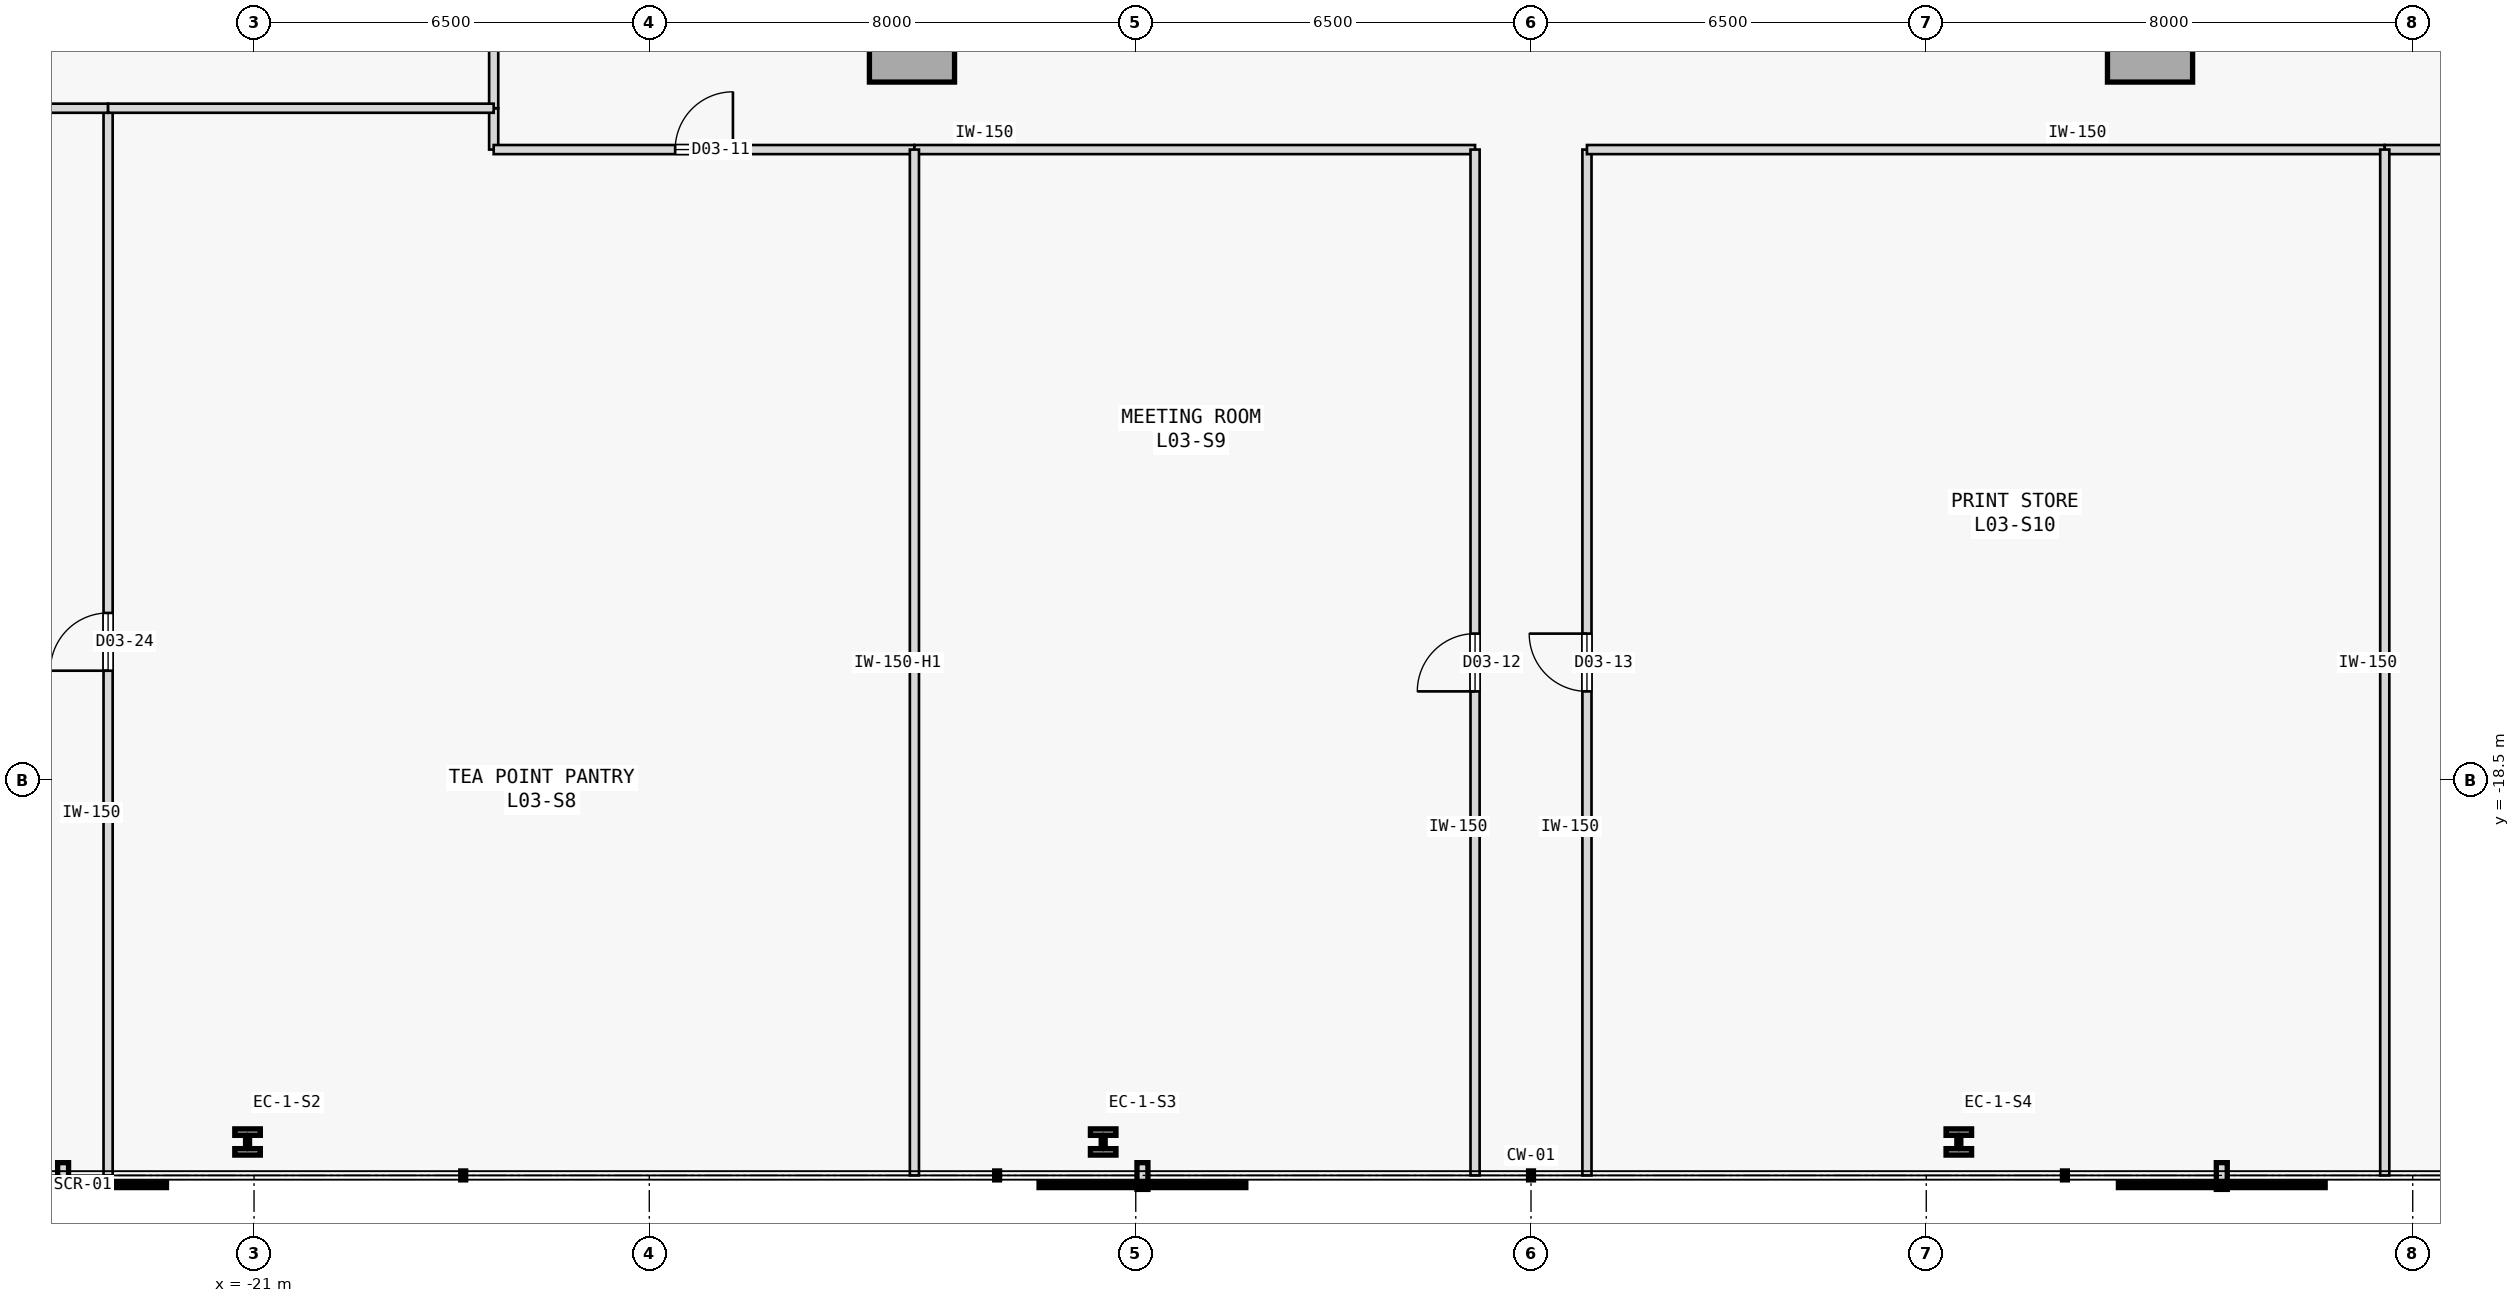
"""IFC4 building model, lengths in metres.
Left out: names, types, materials, properties, quantities, classifications, styles, units other than length and angle.
Written with IfcOpenShell. Run it as: python <this file> out.ifc"""

import sys

from ifc_helpers import new_model, si_unit, direction, frame, frame_2d, origin, origin_2d, place, context, subcontext, project, spatial, rectangle, i_section, extrude, element, fill, save


model = new_model("IFC4")
c1 = context("Model", 3, precision=1e-05, world=origin(), true_north=direction((0.0, 1.0)))
c2 = subcontext(c1, "Body", "Model", "MODEL_VIEW")
j1 = project(units=[si_unit("LENGTHUNIT", "METRE"), si_unit("PLANEANGLEUNIT", "RADIAN")], contexts=[c1])
p1 = place(None, origin())
s1 = spatial("IfcSite", under=j1, at=p1, CompositionType="ELEMENT")
p2 = place(p1, origin())
s2 = spatial("IfcBuilding", under=s1, at=p2, CompositionType="ELEMENT")
p3 = place(p2, frame((0.0, 0.0, 18.0)))
s3 = spatial("IfcBuildingStorey", under=s2, at=p3, CompositionType="ELEMENT", Elevation=18.0)
for number, where, z_axis, x_axis in (
    (1, (-10.18, -6.32, 0.0), (0.0, 0.0, 1.0), (1.0, 0.0, 0.0)),
    (2, (10.18, -6.32, 0.0), (0.0, 0.0, 1.0), (1.0, 0.0, 0.0)),
):
    element("IfcColumn", number, at=place(p3, frame(where, z_axis=z_axis, x_axis=x_axis)), inside=s3, PredefinedType="COLUMN", context=c2, shape_type="SweptSolid", body=[
        extrude(rectangle(XDim=1.4, YDim=1.4, at=origin_2d()), origin(), (0.0, 0.0, 1.0), 3.8),
    ])
for number, where, z_axis, x_axis in (
    (3, (-21.107, -24.45, 0.0), (0.0, 0.0, 1.0), (1.0, 0.0, 0.0)),
    (4, (-7.036, -24.45, 0.0), (0.0, 0.0, 1.0), (1.0, 0.0, 0.0)),
    (5, (7.036, -24.45, 0.0), (0.0, 0.0, 1.0), (1.0, 0.0, 0.0)),
):
    element("IfcColumn", number, at=place(p3, frame(where, z_axis=z_axis, x_axis=x_axis)), inside=s3, PredefinedType="COLUMN", context=c2, shape_type="SweptSolid", body=[
        extrude(i_section(OverallWidth=0.42, OverallDepth=0.431, WebThickness=0.065, FlangeThickness=0.106, FilletRadius=0.015, at=origin_2d()), origin(), (0.0, 0.0, 1.0), 3.8),
    ])
p4 = place(p3, frame((-17.059, -8.13, 0.0), z_axis=(0.0, 0.0, 1.0), x_axis=(0.0, 1.0, 0.0)))
e6 = element("IfcWall", 6, at=p4, inside=s3, PredefinedType="PARTITIONING", context=c2, shape_type="SweptSolid", body=[
    extrude(rectangle(XDim=0.68, YDim=0.15, at=frame_2d((0.34, 0.0))), origin(), (0.0, 0.0, 1.0), 3.575),
])
p5 = place(p3, frame((-17.059, -8.13, 0.0), z_axis=(0.0, 0.0, 1.0), x_axis=(1.0, 0.0, 0.0)))
e7 = element("IfcWall", 7, at=p5, inside=s3, PredefinedType="PARTITIONING", context=c2, shape_type="SweptSolid", body=[
    extrude(rectangle(XDim=6.919, YDim=0.15, at=frame_2d((3.459, 0.0))), origin(), (0.0, 0.0, 1.0), 3.575),
])
p6 = place(p5, frame((2.985, 0.0, 0.0)))
e8 = element("IfcOpeningElement", 8, at=p6, cuts=e7, PredefinedType="OPENING", context=c2, shape_type="SweptSolid", body=[
    extrude(rectangle(XDim=0.95, YDim=2.15, at=frame_2d((0.475, 1.075))), frame((0.0, 0.085, 0.0), z_axis=(0.0, -1.0, 0.0), x_axis=(1.0, 0.0, 0.0)), (0.0, 0.0, 1.0), 0.17),
])
p7 = place(p3, frame((-10.14, -8.13, 0.0), z_axis=(0.0, 0.0, 1.0), x_axis=(1.0, 0.0, 0.0)))
e9 = element("IfcWall", 9, at=p7, inside=s3, PredefinedType="PARTITIONING", context=c2, shape_type="SweptSolid", body=[
    extrude(rectangle(XDim=9.22, YDim=0.15, at=frame_2d((4.61, 0.0))), origin(), (0.0, 0.0, 1.0), 3.575),
])
p8 = place(p3, frame((-0.92, -25.0, 0.0), z_axis=(0.0, 0.0, 1.0), x_axis=(0.0, 1.0, 0.0)))
e10 = element("IfcWall", 10, at=p8, inside=s3, PredefinedType="PARTITIONING", context=c2, shape_type="SweptSolid", body=[
    extrude(rectangle(XDim=16.87, YDim=0.15, at=frame_2d((8.435, 0.0))), origin(), (0.0, 0.0, 1.0), 3.575),
])
p9 = place(p8, frame((7.96, 0.0, 0.0)))
e11 = element("IfcOpeningElement", 11, at=p9, cuts=e10, PredefinedType="OPENING", context=c2, shape_type="SweptSolid", body=[
    extrude(rectangle(XDim=0.95, YDim=2.15, at=frame_2d((0.475, 1.075))), frame((0.0, 0.085, 0.0), z_axis=(0.0, -1.0, 0.0), x_axis=(1.0, 0.0, 0.0)), (0.0, 0.0, 1.0), 0.17),
])
p10 = place(p3, frame((0.92, -25.0, 0.0), z_axis=(0.0, 0.0, 1.0), x_axis=(0.0, 1.0, 0.0)))
e12 = element("IfcWall", 12, at=p10, inside=s3, PredefinedType="PARTITIONING", context=c2, shape_type="SweptSolid", body=[
    extrude(rectangle(XDim=16.87, YDim=0.15, at=frame_2d((8.435, 0.0))), origin(), (0.0, 0.0, 1.0), 3.575),
])
p11 = place(p10, frame((7.96, 0.0, 0.0)))
e13 = element("IfcOpeningElement", 13, at=p11, cuts=e12, PredefinedType="OPENING", context=c2, shape_type="SweptSolid", body=[
    extrude(rectangle(XDim=0.95, YDim=2.15, at=frame_2d((0.475, 1.075))), frame((0.0, 0.085, 0.0), z_axis=(0.0, -1.0, 0.0), x_axis=(1.0, 0.0, 0.0)), (0.0, 0.0, 1.0), 0.17),
])
p12 = place(p3, frame((0.92, -8.13, 0.0), z_axis=(0.0, 0.0, 1.0), x_axis=(1.0, 0.0, 0.0)))
e14 = element("IfcWall", 14, at=p12, inside=s3, PredefinedType="PARTITIONING", context=c2, shape_type="SweptSolid", body=[
    extrude(rectangle(XDim=13.12, YDim=0.15, at=frame_2d((6.56, 0.0))), origin(), (0.0, 0.0, 1.0), 3.575),
])
p13 = place(p3, frame((14.04, -8.13, 0.0), z_axis=(0.0, 0.0, 1.0), x_axis=(1.0, 0.0, 0.0)))
e15 = element("IfcWall", 15, at=p13, inside=s3, PredefinedType="PARTITIONING", context=c2, shape_type="SweptSolid", body=[
    extrude(rectangle(XDim=3.019, YDim=0.15, at=frame_2d((1.51, 0.0))), origin(), (0.0, 0.0, 1.0), 3.575),
])
p14 = place(p13, frame((1.034, 0.0, 0.0)))
e16 = element("IfcOpeningElement", 16, at=p14, cuts=e15, PredefinedType="OPENING", context=c2, shape_type="SweptSolid", body=[
    extrude(rectangle(XDim=0.95, YDim=2.15, at=frame_2d((0.475, 1.075))), frame((0.0, 0.085, 0.0), z_axis=(0.0, -1.0, 0.0), x_axis=(1.0, 0.0, 0.0)), (0.0, 0.0, 1.0), 0.17),
])
p15 = place(p3, frame((-17.059, -7.45, 0.0), z_axis=(0.0, 0.0, 1.0), x_axis=(0.0, 1.0, 0.0)))
e17 = element("IfcWall", 17, at=p15, inside=s3, PredefinedType="PARTITIONING", context=c2, shape_type="SweptSolid", body=[
    extrude(rectangle(XDim=3.129, YDim=0.15, at=frame_2d((1.564, 0.0))), origin(), (0.0, 0.0, 1.0), 3.575),
])
p16 = place(p15, frame((1.09, 0.0, 0.0)))
e18 = element("IfcOpeningElement", 18, at=p16, cuts=e17, PredefinedType="OPENING", context=c2, shape_type="SweptSolid", body=[
    extrude(rectangle(XDim=0.95, YDim=2.15, at=frame_2d((0.475, 1.075))), frame((0.0, 0.085, 0.0), z_axis=(0.0, -1.0, 0.0), x_axis=(1.0, 0.0, 0.0)), (0.0, 0.0, 1.0), 0.17),
])
p17 = place(p3, frame((-23.4, -25.0, 0.0), z_axis=(0.0, 0.0, 1.0), x_axis=(0.0, 1.0, 0.0)))
e19 = element("IfcWall", 19, at=p17, inside=s3, PredefinedType="PARTITIONING", context=c2, shape_type="SweptSolid", body=[
    extrude(rectangle(XDim=17.55, YDim=0.15, at=frame_2d((8.775, 0.0))), origin(), (0.0, 0.0, 1.0), 3.575),
])
p18 = place(p17, frame((8.3, 0.0, 0.0)))
e20 = element("IfcOpeningElement", 20, at=p18, cuts=e19, PredefinedType="OPENING", context=c2, shape_type="SweptSolid", body=[
    extrude(rectangle(XDim=0.95, YDim=2.15, at=frame_2d((0.475, 1.075))), frame((0.0, 0.085, 0.0), z_axis=(0.0, -1.0, 0.0), x_axis=(1.0, 0.0, 0.0)), (0.0, 0.0, 1.0), 0.17),
])
p19 = place(p3, frame((-39.0, -7.45, 0.0), z_axis=(0.0, 0.0, 1.0), x_axis=(1.0, 0.0, 0.0)))
e21 = element("IfcWall", 21, at=p19, inside=s3, PredefinedType="PARTITIONING", context=c2, shape_type="SweptSolid", body=[
    extrude(rectangle(XDim=15.6, YDim=0.15, at=frame_2d((7.8, 0.0))), origin(), (0.0, 0.0, 1.0), 3.575),
])
p20 = place(p3, frame((-10.14, -25.0, 0.0), z_axis=(0.0, 0.0, 1.0), x_axis=(0.0, 1.0, 0.0)))
e22 = element("IfcWall", 22, at=p20, inside=s3, PredefinedType="PARTITIONING", context=c2, shape_type="SweptSolid", body=[
    extrude(rectangle(XDim=16.87, YDim=0.15, at=frame_2d((8.435, 0.0))), origin(), (0.0, 0.0, 1.0), 3.125),
])
p21 = place(p3, frame((-23.4, -7.45, 0.0), z_axis=(0.0, 0.0, 1.0), x_axis=(1.0, 0.0, 0.0)))
e23 = element("IfcWall", 23, at=p21, inside=s3, PredefinedType="PARTITIONING", context=c2, shape_type="SweptSolid", body=[
    extrude(rectangle(XDim=6.341, YDim=0.15, at=frame_2d((3.17, 0.0))), origin(), (0.0, 0.0, 1.0), 3.575),
])
p22 = place(p3, frame((14.04, -25.0, 0.0), z_axis=(0.0, 0.0, 1.0), x_axis=(0.0, 1.0, 0.0)))
e24 = element("IfcWall", 24, at=p22, inside=s3, PredefinedType="PARTITIONING", context=c2, shape_type="SweptSolid", body=[
    extrude(rectangle(XDim=16.87, YDim=0.15, at=frame_2d((8.435, 0.0))), origin(), (0.0, 0.0, 1.0), 3.575),
])
p23 = place(p6, origin())
e25 = element("IfcDoor", 25, at=p23, inside=s3, OperationType="SINGLE_SWING_RIGHT", PredefinedType="DOOR", context=c2, shape_type="SweptSolid", body=[
    extrude(rectangle(XDim=0.95, YDim=2.15, at=frame_2d((0.475, 1.075))), frame((0.0, 0.025, 0.0), z_axis=(0.0, -1.0, 0.0), x_axis=(1.0, 0.0, 0.0)), (0.0, 0.0, 1.0), 0.05),
])
fill(e8, e25)
p24 = place(p9, origin())
e26 = element("IfcDoor", 26, at=p24, inside=s3, OperationType="SINGLE_SWING_LEFT", PredefinedType="DOOR", context=c2, shape_type="SweptSolid", body=[
    extrude(rectangle(XDim=0.95, YDim=2.15, at=frame_2d((0.475, 1.075))), frame((0.0, 0.025, 0.0), z_axis=(0.0, -1.0, 0.0), x_axis=(1.0, 0.0, 0.0)), (0.0, 0.0, 1.0), 0.05),
])
fill(e11, e26)
p25 = place(p11, origin())
e27 = element("IfcDoor", 27, at=p25, inside=s3, OperationType="SINGLE_SWING_RIGHT", PredefinedType="DOOR", context=c2, shape_type="SweptSolid", body=[
    extrude(rectangle(XDim=0.95, YDim=2.15, at=frame_2d((0.475, 1.075))), frame((0.0, 0.025, 0.0), z_axis=(0.0, -1.0, 0.0), x_axis=(1.0, 0.0, 0.0)), (0.0, 0.0, 1.0), 0.05),
])
fill(e13, e27)
p26 = place(p18, origin())
e28 = element("IfcDoor", 28, at=p26, inside=s3, OperationType="SINGLE_SWING_LEFT", PredefinedType="DOOR", context=c2, shape_type="SweptSolid", body=[
    extrude(rectangle(XDim=0.95, YDim=2.15, at=frame_2d((0.475, 1.075))), frame((0.0, 0.025, 0.0), z_axis=(0.0, -1.0, 0.0), x_axis=(1.0, 0.0, 0.0)), (0.0, 0.0, 1.0), 0.05),
])
fill(e20, e28)
save(model, sys.argv[1])
